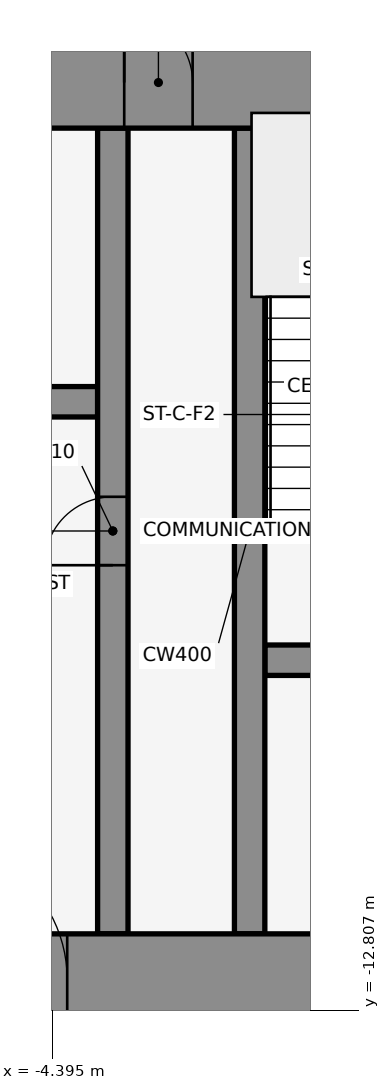
"""IFC4 building model, lengths in metres.
Left out: names, types, materials, properties, quantities, classifications, styles, units other than length and angle.
Written with IfcOpenShell. Run it as: python <this file> out.ifc"""

import sys

from ifc_helpers import new_model, si_unit, direction, frame, frame_2d, origin, place, context, subcontext, project, spatial, rectangle, extrude, element, fill, save


model = new_model("IFC4")
c1 = context("Model", 3, precision=1e-05, world=origin(), true_north=direction((0.0, 1.0)))
c2 = subcontext(c1, "Body", "Model", "MODEL_VIEW")
j1 = project(units=[si_unit("LENGTHUNIT", "METRE"), si_unit("PLANEANGLEUNIT", "RADIAN")], contexts=[c1])
p1 = place(None, origin())
s1 = spatial("IfcSite", under=j1, at=p1, CompositionType="ELEMENT")
p2 = place(p1, origin())
s2 = spatial("IfcBuilding", under=s1, at=p2, CompositionType="ELEMENT")
p3 = place(p2, frame((0.0, 0.0, 315.5)))
s3 = spatial("IfcBuildingStorey", under=s2, at=p3, CompositionType="ELEMENT", Elevation=315.5)
p4 = place(p3, frame((-0.068, -0.105, 0.0), z_axis=(0.0, 0.0, 1.0), x_axis=(-0.83981312244, 0.542875602121, 0.0)))
e1 = element("IfcWall", 1, at=p4, inside=s3, PredefinedType="STANDARD", context=c2, shape_type="SweptSolid", body=[
    extrude(rectangle(XDim=2.183, YDim=0.25, at=frame_2d((1.091, 0.0))), origin(), (0.0, 0.0, 1.0), 4.35),
])
p5 = place(p3, frame((-1.6, -8.2, 0.0), z_axis=(0.0, 0.0, 1.0), x_axis=(1.0, 0.0, 0.0)))
e2 = element("IfcWall", 2, at=p5, inside=s3, PredefinedType="SHEAR", context=c2, shape_type="SweptSolid", body=[
    extrude(rectangle(XDim=3.2, YDim=0.4, at=frame_2d((1.6, 0.0))), origin(), (0.0, 0.0, 1.0), 4.5),
])
p6 = place(p5, frame((1.05, 0.0, 0.0)))
e3 = element("IfcOpeningElement", 3, at=p6, cuts=e2, PredefinedType="OPENING", context=c2, shape_type="SweptSolid", body=[
    extrude(rectangle(XDim=1.2, YDim=2.1, at=frame_2d((0.6, 1.05))), frame((0.0, 0.212, 0.0), z_axis=(0.0, -1.0, 0.0), x_axis=(1.0, 0.0, 0.0)), (0.0, 0.0, 1.0), 0.424),
])
p7 = place(p3, frame((-17.4, -4.8, 0.0), z_axis=(0.0, 0.0, 1.0), x_axis=(1.0, 0.0, 0.0)))
e4 = element("IfcWall", 4, at=p7, inside=s3, PredefinedType="SHEAR", context=c2, shape_type="SweptSolid", body=[
    extrude(rectangle(XDim=13.6, YDim=0.4, at=frame_2d((6.8, 0.0))), origin(), (0.0, 0.0, 1.0), 4.5),
])
p8 = place(p7, frame((0.65, 0.0, 0.0)))
e5 = element("IfcOpeningElement", 5, at=p8, cuts=e4, PredefinedType="OPENING", context=c2, shape_type="SweptSolid", body=[
    extrude(rectangle(XDim=1.1, YDim=2.1, at=frame_2d((0.55, 1.05))), frame((0.0, 0.212, 0.0), z_axis=(0.0, -1.0, 0.0), x_axis=(1.0, 0.0, 0.0)), (0.0, 0.0, 1.0), 0.424),
])
p9 = place(p7, frame((2.95, 0.0, 0.0)))
e6 = element("IfcOpeningElement", 6, at=p9, cuts=e4, PredefinedType="OPENING", context=c2, shape_type="SweptSolid", body=[
    extrude(rectangle(XDim=1.1, YDim=2.1, at=frame_2d((0.55, 1.05))), frame((0.0, 0.212, 0.0), z_axis=(0.0, -1.0, 0.0), x_axis=(1.0, 0.0, 0.0)), (0.0, 0.0, 1.0), 0.424),
])
p10 = place(p7, frame((7.35, 0.0, 0.0)))
e7 = element("IfcOpeningElement", 7, at=p10, cuts=e4, PredefinedType="OPENING", context=c2, shape_type="SweptSolid", body=[
    extrude(rectangle(XDim=0.9, YDim=2.1, at=frame_2d((0.45, 1.05))), frame((0.0, 0.212, 0.0), z_axis=(0.0, -1.0, 0.0), x_axis=(1.0, 0.0, 0.0)), (0.0, 0.0, 1.0), 0.424),
])
p11 = place(p7, frame((11.75, 0.0, 0.0)))
e8 = element("IfcOpeningElement", 8, at=p11, cuts=e4, PredefinedType="OPENING", context=c2, shape_type="SweptSolid", body=[
    extrude(rectangle(XDim=0.9, YDim=2.1, at=frame_2d((0.45, 1.05))), frame((0.0, 0.212, 0.0), z_axis=(0.0, -1.0, 0.0), x_axis=(1.0, 0.0, 0.0)), (0.0, 0.0, 1.0), 0.424),
])
p12 = place(p3, frame((-3.6, -11.8, 0.0), z_axis=(0.0, 0.0, 1.0), x_axis=(0.0, 1.0, 0.0)))
e9 = element("IfcWall", 9, at=p12, inside=s3, PredefinedType="SHEAR", context=c2, shape_type="SweptSolid", body=[
    extrude(rectangle(XDim=10.6, YDim=0.4, at=frame_2d((5.3, 0.0))), origin(), (0.0, 0.0, 1.0), 4.5),
])
p13 = place(p12, frame((4.85, 0.0, 0.0)))
e10 = element("IfcOpeningElement", 10, at=p13, cuts=e9, PredefinedType="OPENING", context=c2, shape_type="SweptSolid", body=[
    extrude(rectangle(XDim=0.9, YDim=2.1, at=frame_2d((0.45, 1.05))), frame((0.0, 0.212, 0.0), z_axis=(0.0, -1.0, 0.0), x_axis=(1.0, 0.0, 0.0)), (0.0, 0.0, 1.0), 0.424),
])
p14 = place(p3, frame((-1.8, -11.8, 0.0), z_axis=(0.0, 0.0, 1.0), x_axis=(0.0, 1.0, 0.0)))
e11 = element("IfcWall", 11, at=p14, inside=s3, PredefinedType="SHEAR", context=c2, shape_type="SweptSolid", body=[
    extrude(rectangle(XDim=10.6, YDim=0.4, at=frame_2d((5.3, 0.0))), origin(), (0.0, 0.0, 1.0), 4.5),
])
p15 = place(p3, frame((-22.0, -0.6, 0.0), z_axis=(0.0, 0.0, 1.0), x_axis=(1.0, 0.0, 0.0)))
e12 = element("IfcWall", 12, at=p15, inside=s3, PredefinedType="SHEAR", context=c2, shape_type="SweptSolid", body=[
    extrude(rectangle(XDim=44.0, YDim=1.2, at=frame_2d((22.0, 0.0))), origin(), (0.0, 0.0, 1.0), 4.5),
])
p16 = place(p15, frame((18.55, 0.0, 0.0)))
e13 = element("IfcOpeningElement", 13, at=p16, cuts=e12, PredefinedType="OPENING", context=c2, shape_type="SweptSolid", body=[
    extrude(rectangle(XDim=0.9, YDim=2.1, at=frame_2d((0.45, 1.05))), frame((0.0, 0.612, 0.0), z_axis=(0.0, -1.0, 0.0), x_axis=(1.0, 0.0, 0.0)), (0.0, 0.0, 1.0), 1.224),
])
p17 = place(p15, frame((24.55, 0.0, 0.0)))
e14 = element("IfcOpeningElement", 14, at=p17, cuts=e12, PredefinedType="OPENING", context=c2, shape_type="SweptSolid", body=[
    extrude(rectangle(XDim=0.9, YDim=2.1, at=frame_2d((0.45, 1.05))), frame((0.0, 0.612, 0.0), z_axis=(0.0, -1.0, 0.0), x_axis=(1.0, 0.0, 0.0)), (0.0, 0.0, 1.0), 1.224),
])
p18 = place(p3, frame((-22.0, -12.4, 0.0), z_axis=(0.0, 0.0, 1.0), x_axis=(1.0, 0.0, 0.0)))
e15 = element("IfcWall", 15, at=p18, inside=s3, PredefinedType="SHEAR", context=c2, shape_type="SweptSolid", body=[
    extrude(rectangle(XDim=44.0, YDim=1.2, at=frame_2d((22.0, 0.0))), origin(), (0.0, 0.0, 1.0), 4.5),
])
p19 = place(p18, frame((2.2, 0.0, 0.0)))
e16 = element("IfcOpeningElement", 16, at=p19, cuts=e15, PredefinedType="OPENING", context=c2, shape_type="SweptSolid", body=[
    extrude(rectangle(XDim=1.2, YDim=2.1, at=frame_2d((0.6, 1.05))), frame((0.0, 0.612, 0.0), z_axis=(0.0, -1.0, 0.0), x_axis=(1.0, 0.0, 0.0)), (0.0, 0.0, 1.0), 1.224),
])
p20 = place(p18, frame((21.4, 0.0, 0.0)))
e17 = element("IfcOpeningElement", 17, at=p20, cuts=e15, PredefinedType="OPENING", context=c2, shape_type="SweptSolid", body=[
    extrude(rectangle(XDim=1.2, YDim=2.1, at=frame_2d((0.6, 1.05))), frame((0.0, 0.612, 0.0), z_axis=(0.0, -1.0, 0.0), x_axis=(1.0, 0.0, 0.0)), (0.0, 0.0, 1.0), 1.224),
])
p21 = place(p18, frame((40.6, 0.0, 0.0)))
e18 = element("IfcOpeningElement", 18, at=p21, cuts=e15, PredefinedType="OPENING", context=c2, shape_type="SweptSolid", body=[
    extrude(rectangle(XDim=1.2, YDim=2.1, at=frame_2d((0.6, 1.05))), frame((0.0, 0.612, 0.0), z_axis=(0.0, -1.0, 0.0), x_axis=(1.0, 0.0, 0.0)), (0.0, 0.0, 1.0), 1.224),
])
p22 = place(p18, frame((16.0, 0.0, 0.0)))
e19 = element("IfcOpeningElement", 19, at=p22, cuts=e15, PredefinedType="OPENING", context=c2, shape_type="SweptSolid", body=[
    extrude(rectangle(XDim=1.8, YDim=2.1, at=frame_2d((0.9, 1.05))), frame((0.0, 0.612, 0.0), z_axis=(0.0, -1.0, 0.0), x_axis=(1.0, 0.0, 0.0)), (0.0, 0.0, 1.0), 1.224),
])
p23 = place(p18, frame((6.3, 0.0, 0.0)))
e20 = element("IfcOpeningElement", 20, at=p23, cuts=e15, PredefinedType="OPENING", context=c2, shape_type="SweptSolid", body=[
    extrude(rectangle(XDim=1.2, YDim=2.1, at=frame_2d((0.6, 1.05))), frame((0.0, 0.612, 0.0), z_axis=(0.0, -1.0, 0.0), x_axis=(1.0, 0.0, 0.0)), (0.0, 0.0, 1.0), 1.224),
])
p24 = place(p18, frame((26.2, 0.0, 0.0)))
e21 = element("IfcOpeningElement", 21, at=p24, cuts=e15, PredefinedType="OPENING", context=c2, shape_type="SweptSolid", body=[
    extrude(rectangle(XDim=1.8, YDim=2.1, at=frame_2d((0.9, 1.05))), frame((0.0, 0.612, 0.0), z_axis=(0.0, -1.0, 0.0), x_axis=(1.0, 0.0, 0.0)), (0.0, 0.0, 1.0), 1.224),
])
p25 = place(p18, frame((36.5, 0.0, 0.0)))
e22 = element("IfcOpeningElement", 22, at=p25, cuts=e15, PredefinedType="OPENING", context=c2, shape_type="SweptSolid", body=[
    extrude(rectangle(XDim=1.2, YDim=2.1, at=frame_2d((0.6, 1.05))), frame((0.0, 0.612, 0.0), z_axis=(0.0, -1.0, 0.0), x_axis=(1.0, 0.0, 0.0)), (0.0, 0.0, 1.0), 1.224),
])
p26 = place(p13, frame((0.9, 0.0, 0.0), z_axis=(0.0, 0.0, 1.0), x_axis=(-1.0, 0.0, 0.0)))
e23 = element("IfcDoor", 23, at=p26, inside=s3, OperationType="SINGLE_SWING_LEFT", PredefinedType="DOOR", context=c2, shape_type="SweptSolid", body=[
    extrude(rectangle(XDim=0.9, YDim=2.1, at=frame_2d((0.45, 1.05))), frame((0.0, 0.025, 0.0), z_axis=(0.0, -1.0, 0.0), x_axis=(1.0, 0.0, 0.0)), (0.0, 0.0, 1.0), 0.05),
])
fill(e10, e23)
p27 = place(p16, origin())
e24 = element("IfcDoor", 24, at=p27, inside=s3, OperationType="SINGLE_SWING_LEFT", PredefinedType="DOOR", context=c2, shape_type="SweptSolid", body=[
    extrude(rectangle(XDim=0.9, YDim=2.1, at=frame_2d((0.45, 1.05))), frame((0.0, 0.025, 0.0), z_axis=(0.0, -1.0, 0.0), x_axis=(1.0, 0.0, 0.0)), (0.0, 0.0, 1.0), 0.05),
])
fill(e13, e24)
p28 = place(p22, origin())
e25 = element("IfcDoor", 25, at=p28, inside=s3, OperationType="SINGLE_SWING_LEFT", PredefinedType="DOOR", context=c2, shape_type="SweptSolid", body=[
    extrude(rectangle(XDim=1.8, YDim=2.1, at=frame_2d((0.9, 1.05))), frame((0.0, 0.025, 0.0), z_axis=(0.0, -1.0, 0.0), x_axis=(1.0, 0.0, 0.0)), (0.0, 0.0, 1.0), 0.05),
])
fill(e19, e25)
save(model, sys.argv[1])
